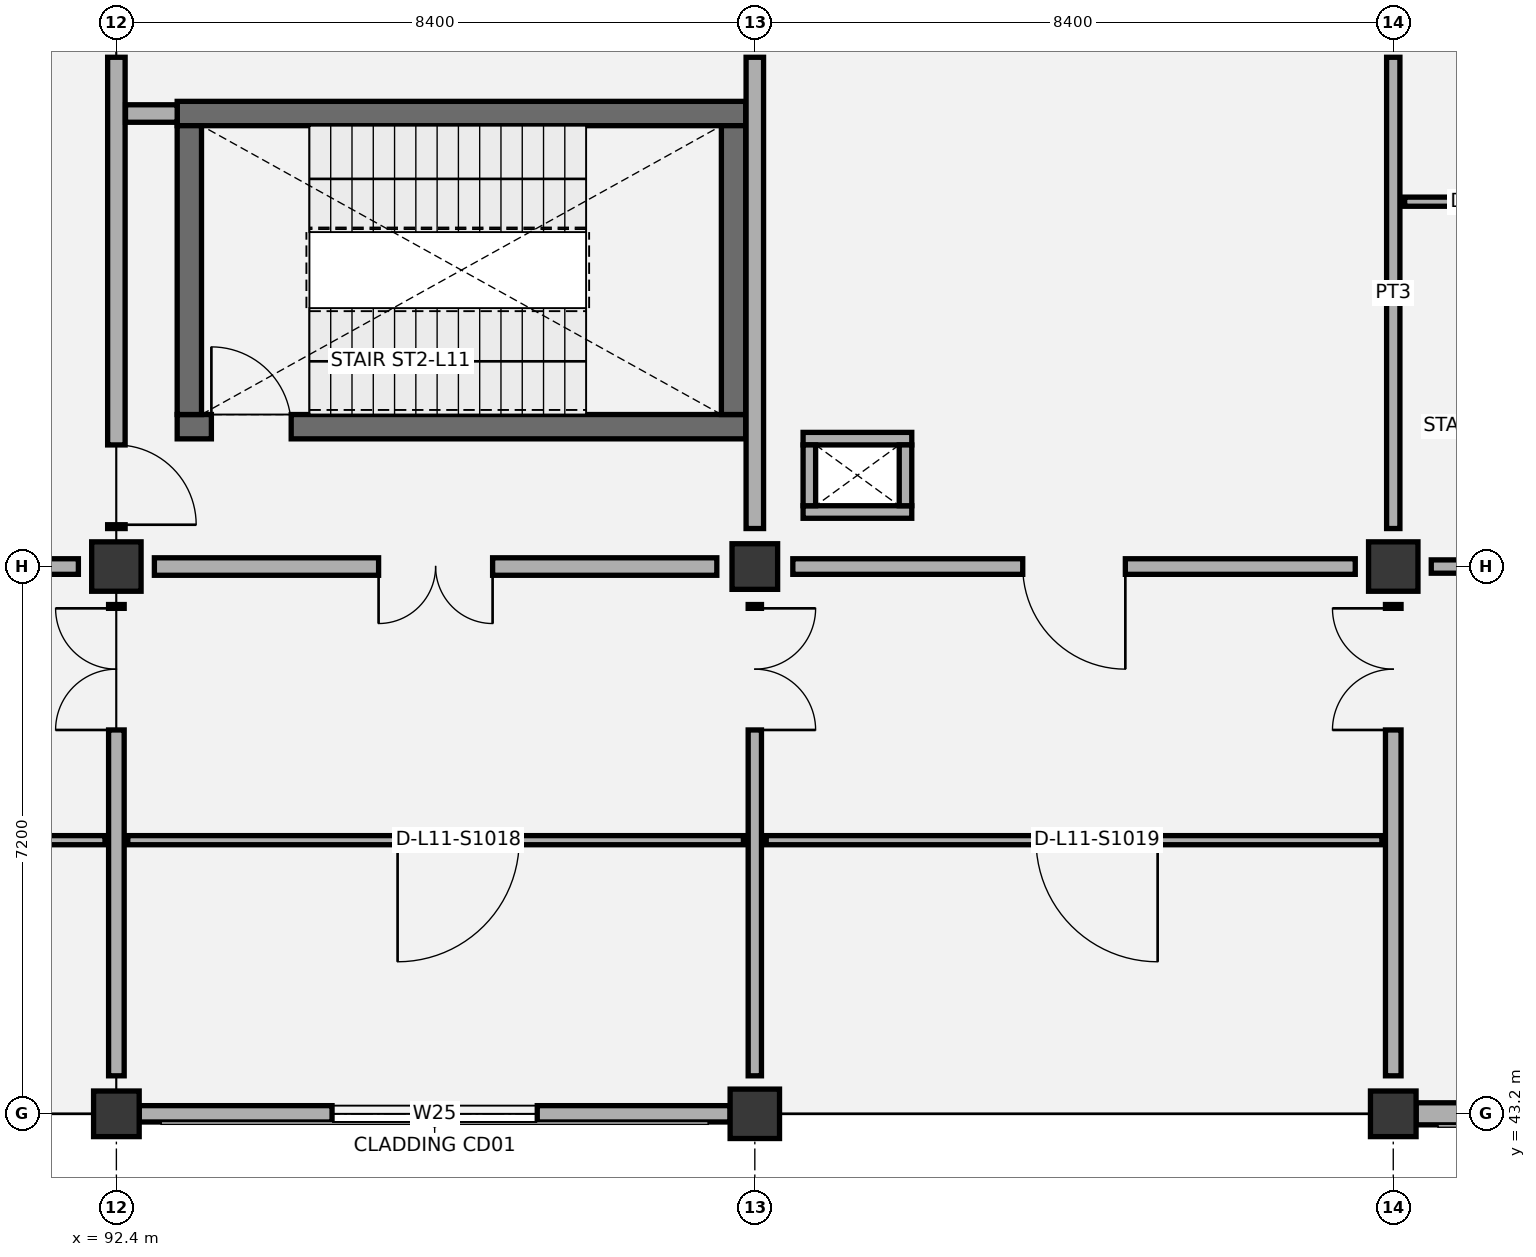
"""IFC4 building model, lengths in metres.
Left out: names, types, materials, properties, quantities, classifications, styles, units other than length and angle.
Written with IfcOpenShell. Run it as: python <this file> out.ifc"""

import sys

from ifc_helpers import new_model, si_unit, direction, frame, frame_2d, origin, origin_2d, place, context, subcontext, project, spatial, rectangle, extrude, element, fill, save


model = new_model("IFC4")
c1 = context("Model", 3, precision=1e-05, world=origin(), true_north=direction((0.0, 1.0)))
c2 = subcontext(c1, "Body", "Model", "MODEL_VIEW")
j1 = project(units=[si_unit("LENGTHUNIT", "METRE"), si_unit("PLANEANGLEUNIT", "RADIAN")], contexts=[c1])
p1 = place(None, origin())
s1 = spatial("IfcSite", under=j1, at=p1, CompositionType="ELEMENT")
p2 = place(p1, origin())
s2 = spatial("IfcBuilding", under=s1, at=p2, CompositionType="ELEMENT")
p3 = place(p2, frame((0.0, 0.0, 52.2)))
s3 = spatial("IfcBuildingStorey", under=s2, at=p3, CompositionType="ELEMENT", Elevation=52.2)
p4 = place(p3, frame((92.4, 43.2, 0.0), z_axis=(0.0, 0.0, 1.0), x_axis=(1.0, 0.0, 0.0)))
e1 = element("IfcColumn", 1, at=p4, inside=s3, PredefinedType="COLUMN", context=c2, shape_type="SweptSolid", body=[
    extrude(rectangle(XDim=0.6, YDim=0.6, at=origin_2d()), origin(), (0.0, 0.0, 1.0), 4.2),
])
for number, where, z_axis, x_axis in (
    (2, (92.4, 50.4, 0.0), (0.0, 0.0, 1.0), (1.0, 0.0, 0.0)),
    (3, (100.8, 43.2, 0.0), (0.0, 0.0, 1.0), (1.0, 0.0, 0.0)),
):
    element("IfcColumn", number, at=place(p3, frame(where, z_axis=z_axis, x_axis=x_axis)), inside=s3, PredefinedType="COLUMN", context=c2, shape_type="SweptSolid", body=[
        extrude(rectangle(XDim=0.65, YDim=0.65, at=origin_2d()), origin(), (0.0, 0.0, 1.0), 4.2),
    ])
for number, where, z_axis, x_axis in (
    (4, (100.8, 50.4, 0.0), (0.0, 0.0, 1.0), (1.0, 0.0, 0.0)),
    (5, (109.2, 43.2, 0.0), (0.0, 0.0, 1.0), (1.0, 0.0, 0.0)),
):
    element("IfcColumn", number, at=place(p3, frame(where, z_axis=z_axis, x_axis=x_axis)), inside=s3, PredefinedType="COLUMN", context=c2, shape_type="SweptSolid", body=[
        extrude(rectangle(XDim=0.6, YDim=0.6, at=origin_2d()), origin(), (0.0, 0.0, 1.0), 4.2),
    ])
p5 = place(p3, frame((109.2, 50.4, 0.0), z_axis=(0.0, 0.0, 1.0), x_axis=(1.0, 0.0, 0.0)))
e6 = element("IfcColumn", 6, at=p5, inside=s3, PredefinedType="COLUMN", context=c2, shape_type="SweptSolid", body=[
    extrude(rectangle(XDim=0.65, YDim=0.65, at=origin_2d()), origin(), (0.0, 0.0, 1.0), 4.2),
])
p6 = place(p3, frame((93.2, 52.24, 0.0), z_axis=(0.0, 0.0, 1.0), x_axis=(1.0, 0.0, 0.0)))
e7 = element("IfcWall", 7, at=p6, inside=s3, PredefinedType="SHEAR", context=c2, shape_type="SweptSolid", body=[
    extrude(rectangle(XDim=7.48, YDim=0.32, at=frame_2d((3.74, 0.0))), origin(), (0.0, 0.0, 1.0), 3.92),
])
p7 = place(p6, frame((0.45, 0.0, 0.0)))
e8 = element("IfcOpeningElement", 8, at=p7, cuts=e7, PredefinedType="OPENING", context=c2, shape_type="SweptSolid", body=[
    extrude(rectangle(XDim=1.05, YDim=2.15, at=frame_2d((0.525, 1.075))), frame((0.0, 0.17, 0.0), z_axis=(0.0, -1.0, 0.0), x_axis=(1.0, 0.0, 0.0)), (0.0, 0.0, 1.0), 0.34),
])
p8 = place(p3, frame((93.2, 56.36, 0.0), z_axis=(0.0, 0.0, 1.0), x_axis=(1.0, 0.0, 0.0)))
e9 = element("IfcWall", 9, at=p8, inside=s3, PredefinedType="SHEAR", context=c2, shape_type="SweptSolid", body=[
    extrude(rectangle(XDim=7.48, YDim=0.32, at=frame_2d((3.74, 0.0))), origin(), (0.0, 0.0, 1.0), 3.92),
])
for number, where, z_axis, x_axis in (
    (10, (93.36, 52.4, 0.0), (0.0, 0.0, 1.0), (0.0, 1.0, 0.0)),
    (11, (100.52, 52.4, 0.0), (0.0, 0.0, 1.0), (0.0, 1.0, 0.0)),
):
    element("IfcWall", number, at=place(p3, frame(where, z_axis=z_axis, x_axis=x_axis)), inside=s3, PredefinedType="SHEAR", context=c2, shape_type="SweptSolid", body=[
        extrude(rectangle(XDim=3.8, YDim=0.32, at=frame_2d((1.9, 0.0))), origin(), (0.0, 0.0, 1.0), 3.92),
    ])
p9 = place(p3, frame((92.7, 43.2, 0.0), z_axis=(0.0, 0.0, 1.0), x_axis=(1.0, 0.0, 0.0)))
e12 = element("IfcWall", 12, at=p9, inside=s3, PredefinedType="SOLIDWALL", context=c2, shape_type="SweptSolid", body=[
    extrude(rectangle(XDim=7.775, YDim=0.215, at=frame_2d((3.888, 0.0))), origin(), (0.0, 0.0, 1.0), 3.365),
])
p10 = place(p9, frame((2.538, 0.0, 0.95)))
e13 = element("IfcOpeningElement", 13, at=p10, cuts=e12, PredefinedType="OPENING", context=c2, shape_type="SweptSolid", body=[
    extrude(rectangle(XDim=2.7, YDim=1.65, at=frame_2d((1.35, 0.825))), frame((0.0, 0.117, 0.0), z_axis=(0.0, -1.0, 0.0), x_axis=(1.0, 0.0, 0.0)), (0.0, 0.0, 1.0), 0.235),
])
p11 = place(p3, frame((109.5, 43.2, 0.0), z_axis=(0.0, 0.0, 1.0), x_axis=(1.0, 0.0, 0.0)))
e14 = element("IfcWall", 14, at=p11, inside=s3, PredefinedType="SOLIDWALL", context=c2, shape_type="SweptSolid", body=[
    extrude(rectangle(XDim=7.775, YDim=0.29, at=frame_2d((3.887, 0.0))), origin(), (0.0, 0.0, 1.0), 3.365),
])
p12 = place(p11, frame((1.692, 0.0, 0.95)))
e15 = element("IfcOpeningElement", 15, at=p12, cuts=e14, PredefinedType="OPENING", context=c2, shape_type="SweptSolid", body=[
    extrude(rectangle(XDim=1.35, YDim=1.65, at=frame_2d((0.675, 0.825))), frame((0.0, 0.155, 0.0), z_axis=(0.0, -1.0, 0.0), x_axis=(1.0, 0.0, 0.0)), (0.0, 0.0, 1.0), 0.31),
])
p13 = place(p11, frame((4.733, 0.0, 0.95)))
e16 = element("IfcOpeningElement", 16, at=p13, cuts=e14, PredefinedType="OPENING", context=c2, shape_type="SweptSolid", body=[
    extrude(rectangle(XDim=1.35, YDim=1.65, at=frame_2d((0.675, 0.825))), frame((0.0, 0.155, 0.0), z_axis=(0.0, -1.0, 0.0), x_axis=(1.0, 0.0, 0.0)), (0.0, 0.0, 1.0), 0.31),
])
for number, where, z_axis, x_axis in (
    (17, (101.435, 51.117, 0.0), (0.0, 0.0, 1.0), (1.0, 0.0, 0.0)),
    (18, (101.435, 52.083, 0.0), (0.0, 0.0, 1.0), (1.0, 0.0, 0.0)),
):
    element("IfcWall", number, at=place(p3, frame(where, z_axis=z_axis, x_axis=x_axis)), inside=s3, PredefinedType="PARTITIONING", context=c2, shape_type="SweptSolid", body=[
        extrude(rectangle(XDim=1.43, YDim=0.165, at=frame_2d((0.715, 0.0))), origin(), (0.0, 0.0, 1.0), 3.92),
    ])
for number, where, z_axis, x_axis in (
    (19, (101.518, 51.2, 0.0), (0.0, 0.0, 1.0), (0.0, 1.0, 0.0)),
    (20, (102.782, 51.2, 0.0), (0.0, 0.0, 1.0), (0.0, 1.0, 0.0)),
):
    element("IfcWall", number, at=place(p3, frame(where, z_axis=z_axis, x_axis=x_axis)), inside=s3, PredefinedType="PARTITIONING", context=c2, shape_type="SweptSolid", body=[
        extrude(rectangle(XDim=0.8, YDim=0.165, at=frame_2d((0.4, 0.0))), origin(), (0.0, 0.0, 1.0), 3.92),
    ])
p14 = place(p3, frame((109.35, 55.2, 0.0), z_axis=(0.0, 0.0, 1.0), x_axis=(1.0, 0.0, 0.0)))
e21 = element("IfcWall", 21, at=p14, inside=s3, PredefinedType="PARTITIONING", context=c2, shape_type="SweptSolid", body=[
    extrude(rectangle(XDim=8.1, YDim=0.12, at=frame_2d((4.05, 0.0))), origin(), (0.0, 0.0, 1.0), 3.92),
])
p15 = place(p14, frame((1.08, 0.0, 0.0)))
e22 = element("IfcOpeningElement", 22, at=p15, cuts=e21, PredefinedType="OPENING", context=c2, shape_type="SweptSolid", body=[
    extrude(rectangle(XDim=0.95, YDim=2.1, at=frame_2d((0.475, 1.05))), frame((0.0, 0.07, 0.0), z_axis=(0.0, -1.0, 0.0), x_axis=(1.0, 0.0, 0.0)), (0.0, 0.0, 1.0), 0.14),
])
p16 = place(p14, frame((3.63, 0.0, 0.0)))
e23 = element("IfcOpeningElement", 23, at=p16, cuts=e21, PredefinedType="OPENING", context=c2, shape_type="SweptSolid", body=[
    extrude(rectangle(XDim=0.9, YDim=2.1, at=frame_2d((0.45, 1.05))), frame((0.0, 0.07, 0.0), z_axis=(0.0, -1.0, 0.0), x_axis=(1.0, 0.0, 0.0)), (0.0, 0.0, 1.0), 0.14),
])
p17 = place(p14, frame((6.13, 0.0, 0.0)))
e24 = element("IfcOpeningElement", 24, at=p17, cuts=e21, PredefinedType="OPENING", context=c2, shape_type="SweptSolid", body=[
    extrude(rectangle(XDim=1.0, YDim=2.1, at=frame_2d((0.5, 1.05))), frame((0.0, 0.07, 0.0), z_axis=(0.0, -1.0, 0.0), x_axis=(1.0, 0.0, 0.0)), (0.0, 0.0, 1.0), 0.14),
])
p18 = place(p3, frame((84.15, 46.8, 0.0), z_axis=(0.0, 0.0, 1.0), x_axis=(1.0, 0.0, 0.0)))
e25 = element("IfcWall", 25, at=p18, inside=s3, PredefinedType="PARTITIONING", context=c2, shape_type="SweptSolid", body=[
    extrude(rectangle(XDim=8.1, YDim=0.12, at=frame_2d((4.05, 0.0))), origin(), (0.0, 0.0, 1.0), 3.92),
])
p19 = place(p18, frame((3.55, 0.0, 0.0)))
e26 = element("IfcOpeningElement", 26, at=p19, cuts=e25, PredefinedType="OPENING", context=c2, shape_type="SweptSolid", body=[
    extrude(rectangle(XDim=1.6, YDim=2.2, at=frame_2d((0.8, 1.1))), frame((0.0, 0.07, 0.0), z_axis=(0.0, -1.0, 0.0), x_axis=(1.0, 0.0, 0.0)), (0.0, 0.0, 1.0), 0.14),
])
p20 = place(p3, frame((92.55, 46.8, 0.0), z_axis=(0.0, 0.0, 1.0), x_axis=(1.0, 0.0, 0.0)))
e27 = element("IfcWall", 27, at=p20, inside=s3, PredefinedType="PARTITIONING", context=c2, shape_type="SweptSolid", body=[
    extrude(rectangle(XDim=8.1, YDim=0.12, at=frame_2d((4.05, 0.0))), origin(), (0.0, 0.0, 1.0), 3.92),
])
p21 = place(p20, frame((3.55, 0.0, 0.0)))
e28 = element("IfcOpeningElement", 28, at=p21, cuts=e27, PredefinedType="OPENING", context=c2, shape_type="SweptSolid", body=[
    extrude(rectangle(XDim=1.6, YDim=2.2, at=frame_2d((0.8, 1.1))), frame((0.0, 0.07, 0.0), z_axis=(0.0, -1.0, 0.0), x_axis=(1.0, 0.0, 0.0)), (0.0, 0.0, 1.0), 0.14),
])
p22 = place(p3, frame((100.95, 46.8, 0.0), z_axis=(0.0, 0.0, 1.0), x_axis=(1.0, 0.0, 0.0)))
e29 = element("IfcWall", 29, at=p22, inside=s3, PredefinedType="PARTITIONING", context=c2, shape_type="SweptSolid", body=[
    extrude(rectangle(XDim=8.1, YDim=0.12, at=frame_2d((4.05, 0.0))), origin(), (0.0, 0.0, 1.0), 3.92),
])
p23 = place(p22, frame((3.55, 0.0, 0.0)))
e30 = element("IfcOpeningElement", 30, at=p23, cuts=e29, PredefinedType="OPENING", context=c2, shape_type="SweptSolid", body=[
    extrude(rectangle(XDim=1.6, YDim=2.2, at=frame_2d((0.8, 1.1))), frame((0.0, 0.07, 0.0), z_axis=(0.0, -1.0, 0.0), x_axis=(1.0, 0.0, 0.0)), (0.0, 0.0, 1.0), 0.14),
])
p24 = place(p3, frame((92.4, 43.7, 0.0), z_axis=(0.0, 0.0, 1.0), x_axis=(0.0, 1.0, 0.0)))
e31 = element("IfcWall", 31, at=p24, inside=s3, PredefinedType="PARTITIONING", context=c2, shape_type="SweptSolid", body=[
    extrude(rectangle(XDim=6.2, YDim=0.205, at=frame_2d((3.1, 0.0))), origin(), (0.0, 0.0, 1.0), 3.415),
])
p25 = place(p24, frame((4.55, 0.0, 0.0)))
e32 = element("IfcOpeningElement", 32, at=p25, cuts=e31, PredefinedType="OPENING", context=c2, shape_type="SweptSolid", body=[
    extrude(rectangle(XDim=1.6, YDim=2.2, at=frame_2d((0.8, 1.1))), frame((0.0, 0.113, 0.0), z_axis=(0.0, -1.0, 0.0), x_axis=(1.0, 0.0, 0.0)), (0.0, 0.0, 1.0), 0.225),
])
p26 = place(p3, frame((84.5, 50.4, 0.0), z_axis=(0.0, 0.0, 1.0), x_axis=(1.0, 0.0, 0.0)))
e33 = element("IfcWall", 33, at=p26, inside=s3, PredefinedType="PARTITIONING", context=c2, shape_type="SweptSolid", body=[
    extrude(rectangle(XDim=7.4, YDim=0.205, at=frame_2d((3.7, 0.0))), origin(), (0.0, 0.0, 1.0), 3.465),
])
p27 = place(p26, frame((3.075, 0.0, 0.0)))
e34 = element("IfcOpeningElement", 34, at=p27, cuts=e33, PredefinedType="OPENING", context=c2, shape_type="SweptSolid", body=[
    extrude(rectangle(XDim=1.25, YDim=2.1, at=frame_2d((0.625, 1.05))), frame((0.0, 0.113, 0.0), z_axis=(0.0, -1.0, 0.0), x_axis=(1.0, 0.0, 0.0)), (0.0, 0.0, 1.0), 0.225),
])
p28 = place(p3, frame((92.4, 50.9, 0.0), z_axis=(0.0, 0.0, 1.0), x_axis=(0.0, 1.0, 0.0)))
e35 = element("IfcWall", 35, at=p28, inside=s3, PredefinedType="PARTITIONING", context=c2, shape_type="SweptSolid", body=[
    extrude(rectangle(XDim=6.2, YDim=0.23, at=frame_2d((3.1, 0.0))), origin(), (0.0, 0.0, 1.0), 3.415),
])
p29 = place(p28, frame((0.05, 0.0, 0.0)))
e36 = element("IfcOpeningElement", 36, at=p29, cuts=e35, PredefinedType="OPENING", context=c2, shape_type="SweptSolid", body=[
    extrude(rectangle(XDim=1.05, YDim=2.15, at=frame_2d((0.525, 1.075))), frame((0.0, 0.125, 0.0), z_axis=(0.0, -1.0, 0.0), x_axis=(1.0, 0.0, 0.0)), (0.0, 0.0, 1.0), 0.25),
])
p30 = place(p3, frame((100.8, 43.7, 0.0), z_axis=(0.0, 0.0, 1.0), x_axis=(0.0, 1.0, 0.0)))
e37 = element("IfcWall", 37, at=p30, inside=s3, PredefinedType="PARTITIONING", context=c2, shape_type="SweptSolid", body=[
    extrude(rectangle(XDim=6.2, YDim=0.175, at=frame_2d((3.1, 0.0))), origin(), (0.0, 0.0, 1.0), 3.415),
])
p31 = place(p30, frame((4.55, 0.0, 0.0)))
e38 = element("IfcOpeningElement", 38, at=p31, cuts=e37, PredefinedType="OPENING", context=c2, shape_type="SweptSolid", body=[
    extrude(rectangle(XDim=1.6, YDim=2.2, at=frame_2d((0.8, 1.1))), frame((0.0, 0.097, 0.0), z_axis=(0.0, -1.0, 0.0), x_axis=(1.0, 0.0, 0.0)), (0.0, 0.0, 1.0), 0.195),
])
p32 = place(p3, frame((92.9, 50.4, 0.0), z_axis=(0.0, 0.0, 1.0), x_axis=(1.0, 0.0, 0.0)))
e39 = element("IfcWall", 39, at=p32, inside=s3, PredefinedType="PARTITIONING", context=c2, shape_type="SweptSolid", body=[
    extrude(rectangle(XDim=7.4, YDim=0.23, at=frame_2d((3.7, 0.0))), origin(), (0.0, 0.0, 1.0), 3.515),
])
p33 = place(p32, frame((2.95, 0.0, 0.0)))
e40 = element("IfcOpeningElement", 40, at=p33, cuts=e39, PredefinedType="OPENING", context=c2, shape_type="SweptSolid", body=[
    extrude(rectangle(XDim=1.5, YDim=2.15, at=frame_2d((0.75, 1.075))), frame((0.0, 0.125, 0.0), z_axis=(0.0, -1.0, 0.0), x_axis=(1.0, 0.0, 0.0)), (0.0, 0.0, 1.0), 0.25),
])
p34 = place(p3, frame((100.8, 50.9, 0.0), z_axis=(0.0, 0.0, 1.0), x_axis=(0.0, 1.0, 0.0)))
e41 = element("IfcWall", 41, at=p34, inside=s3, PredefinedType="PARTITIONING", context=c2, shape_type="SweptSolid", body=[
    extrude(rectangle(XDim=6.2, YDim=0.23, at=frame_2d((3.1, 0.0))), origin(), (0.0, 0.0, 1.0), 3.515),
])
p35 = place(p3, frame((92.52, 56.36, 0.0), z_axis=(0.0, 0.0, 1.0), x_axis=(1.0, 0.0, 0.0)))
e42 = element("IfcWall", 42, at=p35, inside=s3, PredefinedType="PARTITIONING", context=c2, shape_type="SweptSolid", body=[
    extrude(rectangle(XDim=0.68, YDim=0.23, at=frame_2d((0.34, 0.0))), origin(), (0.0, 0.0, 1.0), 3.92),
])
p36 = place(p3, frame((109.2, 43.7, 0.0), z_axis=(0.0, 0.0, 1.0), x_axis=(0.0, 1.0, 0.0)))
e43 = element("IfcWall", 43, at=p36, inside=s3, PredefinedType="PARTITIONING", context=c2, shape_type="SweptSolid", body=[
    extrude(rectangle(XDim=6.2, YDim=0.205, at=frame_2d((3.1, 0.0))), origin(), (0.0, 0.0, 1.0), 3.515),
])
p37 = place(p36, frame((4.55, 0.0, 0.0)))
e44 = element("IfcOpeningElement", 44, at=p37, cuts=e43, PredefinedType="OPENING", context=c2, shape_type="SweptSolid", body=[
    extrude(rectangle(XDim=1.6, YDim=2.2, at=frame_2d((0.8, 1.1))), frame((0.0, 0.113, 0.0), z_axis=(0.0, -1.0, 0.0), x_axis=(1.0, 0.0, 0.0)), (0.0, 0.0, 1.0), 0.225),
])
p38 = place(p3, frame((101.3, 50.4, 0.0), z_axis=(0.0, 0.0, 1.0), x_axis=(1.0, 0.0, 0.0)))
e45 = element("IfcWall", 45, at=p38, inside=s3, PredefinedType="PARTITIONING", context=c2, shape_type="SweptSolid", body=[
    extrude(rectangle(XDim=7.4, YDim=0.205, at=frame_2d((3.7, 0.0))), origin(), (0.0, 0.0, 1.0), 3.565),
])
p39 = place(p38, frame((3.025, 0.0, 0.0)))
e46 = element("IfcOpeningElement", 46, at=p39, cuts=e45, PredefinedType="OPENING", context=c2, shape_type="SweptSolid", body=[
    extrude(rectangle(XDim=1.35, YDim=2.15, at=frame_2d((0.675, 1.075))), frame((0.0, 0.113, 0.0), z_axis=(0.0, -1.0, 0.0), x_axis=(1.0, 0.0, 0.0)), (0.0, 0.0, 1.0), 0.225),
])
p40 = place(p3, frame((109.2, 50.9, 0.0), z_axis=(0.0, 0.0, 1.0), x_axis=(0.0, 1.0, 0.0)))
e47 = element("IfcWall", 47, at=p40, inside=s3, PredefinedType="PARTITIONING", context=c2, shape_type="SweptSolid", body=[
    extrude(rectangle(XDim=6.2, YDim=0.175, at=frame_2d((3.1, 0.0))), origin(), (0.0, 0.0, 1.0), 3.415),
])
p41 = place(p3, frame((109.7, 50.4, 0.0), z_axis=(0.0, 0.0, 1.0), x_axis=(1.0, 0.0, 0.0)))
e48 = element("IfcWall", 48, at=p41, inside=s3, PredefinedType="PARTITIONING", context=c2, shape_type="SweptSolid", body=[
    extrude(rectangle(XDim=7.4, YDim=0.175, at=frame_2d((3.7, 0.0))), origin(), (0.0, 0.0, 1.0), 3.365),
])
p42 = place(p10, origin())
e49 = element("IfcWindow", 49, at=p42, inside=s3, PartitioningType="SINGLE_PANEL", PredefinedType="WINDOW", context=c2, shape_type="SweptSolid", body=[
    extrude(rectangle(XDim=2.7, YDim=1.65, at=frame_2d((1.35, 0.825))), frame((0.0, 0.03, 0.0), z_axis=(0.0, -1.0, 0.0), x_axis=(1.0, 0.0, 0.0)), (0.0, 0.0, 1.0), 0.06),
])
fill(e13, e49)
p43 = place(p7, origin())
e50 = element("IfcDoor", 50, at=p43, inside=s3, OperationType="SINGLE_SWING_LEFT", PredefinedType="DOOR", context=c2, shape_type="SweptSolid", body=[
    extrude(rectangle(XDim=1.05, YDim=2.15, at=frame_2d((0.525, 1.075))), frame((0.0, 0.025, 0.0), z_axis=(0.0, -1.0, 0.0), x_axis=(1.0, 0.0, 0.0)), (0.0, 0.0, 1.0), 0.05),
])
fill(e8, e50)
p44 = place(p21, frame((1.6, 0.0, 0.0), z_axis=(0.0, 0.0, 1.0), x_axis=(-1.0, 0.0, 0.0)))
e51 = element("IfcDoor", 51, at=p44, inside=s3, OperationType="SINGLE_SWING_RIGHT", PredefinedType="DOOR", context=c2, shape_type="SweptSolid", body=[
    extrude(rectangle(XDim=1.6, YDim=2.2, at=frame_2d((0.8, 1.1))), frame((0.0, 0.025, 0.0), z_axis=(0.0, -1.0, 0.0), x_axis=(1.0, 0.0, 0.0)), (0.0, 0.0, 1.0), 0.05),
])
fill(e28, e51)
p45 = place(p23, frame((1.6, 0.0, 0.0), z_axis=(0.0, 0.0, 1.0), x_axis=(-1.0, 0.0, 0.0)))
e52 = element("IfcDoor", 52, at=p45, inside=s3, OperationType="SINGLE_SWING_LEFT", PredefinedType="DOOR", context=c2, shape_type="SweptSolid", body=[
    extrude(rectangle(XDim=1.6, YDim=2.2, at=frame_2d((0.8, 1.1))), frame((0.0, 0.025, 0.0), z_axis=(0.0, -1.0, 0.0), x_axis=(1.0, 0.0, 0.0)), (0.0, 0.0, 1.0), 0.05),
])
fill(e30, e52)
p46 = place(p25, origin())
e53 = element("IfcDoor", 53, at=p46, inside=s3, OperationType="DOUBLE_DOOR_SINGLE_SWING", PredefinedType="DOOR", context=c2, shape_type="SweptSolid", body=[
    extrude(rectangle(XDim=1.6, YDim=2.2, at=frame_2d((0.8, 1.1))), frame((0.0, 0.025, 0.0), z_axis=(0.0, -1.0, 0.0), x_axis=(1.0, 0.0, 0.0)), (0.0, 0.0, 1.0), 0.05),
])
fill(e32, e53)
p47 = place(p29, frame((1.05, 0.0, 0.0), z_axis=(0.0, 0.0, 1.0), x_axis=(-1.0, 0.0, 0.0)))
e54 = element("IfcDoor", 54, at=p47, inside=s3, OperationType="SINGLE_SWING_RIGHT", PredefinedType="DOOR", context=c2, shape_type="SweptSolid", body=[
    extrude(rectangle(XDim=1.05, YDim=2.15, at=frame_2d((0.525, 1.075))), frame((0.0, 0.025, 0.0), z_axis=(0.0, -1.0, 0.0), x_axis=(1.0, 0.0, 0.0)), (0.0, 0.0, 1.0), 0.05),
])
fill(e36, e54)
p48 = place(p31, frame((1.6, 0.0, 0.0), z_axis=(0.0, 0.0, 1.0), x_axis=(-1.0, 0.0, 0.0)))
e55 = element("IfcDoor", 55, at=p48, inside=s3, OperationType="DOUBLE_DOOR_SINGLE_SWING", PredefinedType="DOOR", context=c2, shape_type="SweptSolid", body=[
    extrude(rectangle(XDim=1.6, YDim=2.2, at=frame_2d((0.8, 1.1))), frame((0.0, 0.025, 0.0), z_axis=(0.0, -1.0, 0.0), x_axis=(1.0, 0.0, 0.0)), (0.0, 0.0, 1.0), 0.05),
])
fill(e38, e55)
p49 = place(p33, frame((1.5, 0.0, 0.0), z_axis=(0.0, 0.0, 1.0), x_axis=(-1.0, 0.0, 0.0)))
e56 = element("IfcDoor", 56, at=p49, inside=s3, OperationType="DOUBLE_DOOR_SINGLE_SWING", PredefinedType="DOOR", context=c2, shape_type="SweptSolid", body=[
    extrude(rectangle(XDim=1.5, YDim=2.15, at=frame_2d((0.75, 1.075))), frame((0.0, 0.025, 0.0), z_axis=(0.0, -1.0, 0.0), x_axis=(1.0, 0.0, 0.0)), (0.0, 0.0, 1.0), 0.05),
])
fill(e40, e56)
p50 = place(p37, origin())
e57 = element("IfcDoor", 57, at=p50, inside=s3, OperationType="DOUBLE_DOOR_SINGLE_SWING", PredefinedType="DOOR", context=c2, shape_type="SweptSolid", body=[
    extrude(rectangle(XDim=1.6, YDim=2.2, at=frame_2d((0.8, 1.1))), frame((0.0, 0.025, 0.0), z_axis=(0.0, -1.0, 0.0), x_axis=(1.0, 0.0, 0.0)), (0.0, 0.0, 1.0), 0.05),
])
fill(e44, e57)
p51 = place(p39, frame((1.35, 0.0, 0.0), z_axis=(0.0, 0.0, 1.0), x_axis=(-1.0, 0.0, 0.0)))
e58 = element("IfcDoor", 58, at=p51, inside=s3, OperationType="SINGLE_SWING_LEFT", PredefinedType="DOOR", context=c2, shape_type="SweptSolid", body=[
    extrude(rectangle(XDim=1.35, YDim=2.15, at=frame_2d((0.675, 1.075))), frame((0.0, 0.025, 0.0), z_axis=(0.0, -1.0, 0.0), x_axis=(1.0, 0.0, 0.0)), (0.0, 0.0, 1.0), 0.05),
])
fill(e46, e58)
save(model, sys.argv[1])
